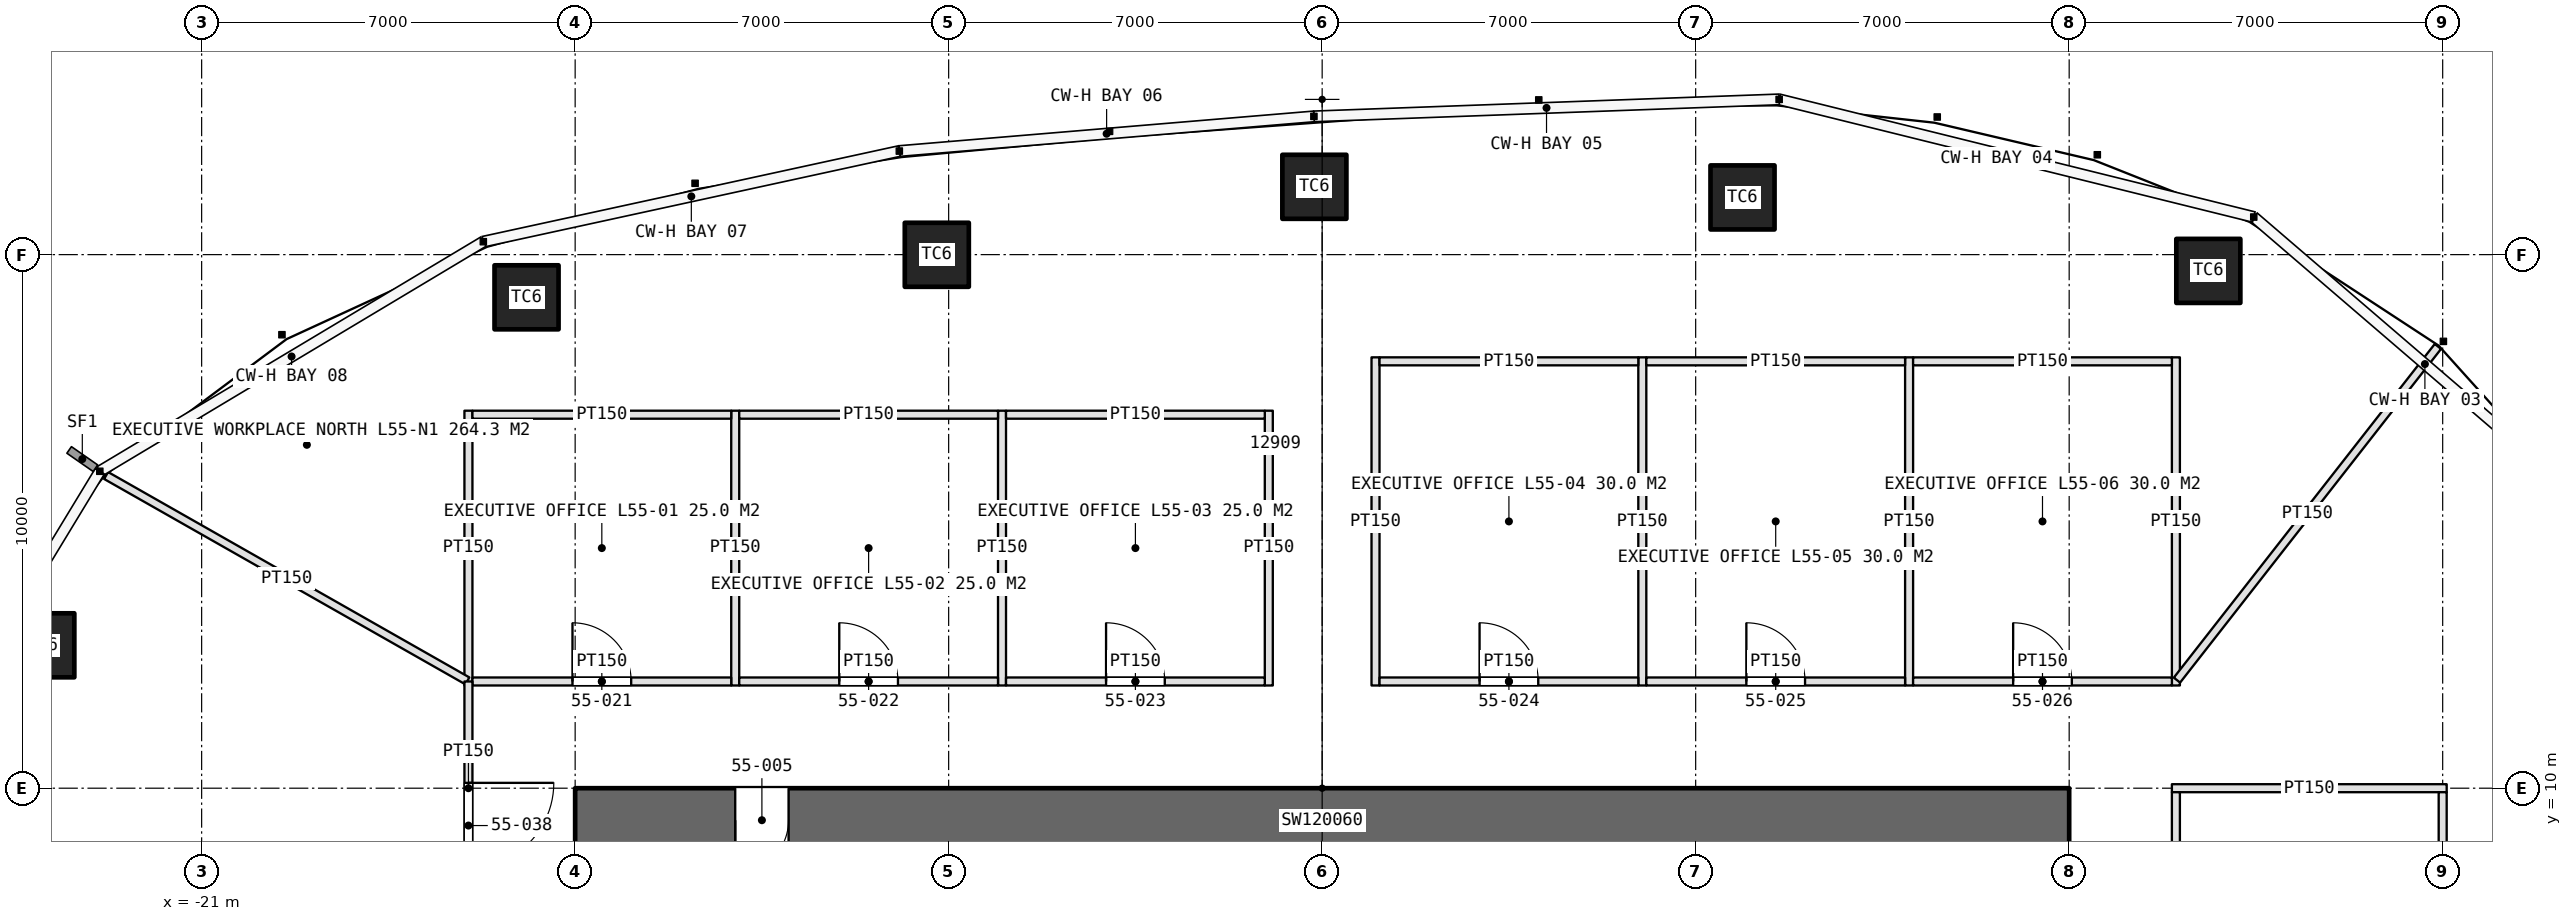
"""IFC4 building model, lengths in metres.
Left out: names, types, materials, properties, quantities, classifications, styles, units other than length and angle.
Written with IfcOpenShell. Run it as: python <this file> out.ifc"""

import sys

from ifc_helpers import new_model, si_unit, direction, frame, frame_2d, origin, origin_2d, place, context, subcontext, project, spatial, rectangle, extrude, element, fill, save


model = new_model("IFC4")
c1 = context("Model", 3, precision=1e-05, world=origin(), true_north=direction((0.0, 1.0)))
c2 = subcontext(c1, "Body", "Model", "MODEL_VIEW")
j1 = project(units=[si_unit("LENGTHUNIT", "METRE"), si_unit("PLANEANGLEUNIT", "RADIAN")], contexts=[c1])
p1 = place(None, origin())
s1 = spatial("IfcSite", under=j1, at=p1, CompositionType="ELEMENT")
p2 = place(p1, origin())
s2 = spatial("IfcBuilding", under=s1, at=p2, CompositionType="ELEMENT")
p3 = place(p2, frame((0.0, 0.0, 249.4)))
s3 = spatial("IfcBuildingStorey", under=s2, at=p3, CompositionType="ELEMENT", Elevation=249.4)
p4 = place(p3, frame((14.0, 9.4, 0.0), z_axis=(0.0, 0.0, 1.0), x_axis=(-1.0, 0.0, 0.0)))
e1 = element("IfcWall", 1, at=p4, inside=s3, PredefinedType="SHEAR", context=c2, shape_type="SweptSolid", body=[
    extrude(rectangle(XDim=28.0, YDim=1.2, at=frame_2d((14.0, 0.0))), origin(), (0.0, 0.0, 1.0), 4.2),
])
p5 = place(p4, frame((24.0, 0.0, 0.0)))
e2 = element("IfcOpeningElement", 2, at=p5, cuts=e1, PredefinedType="OPENING", context=c2, shape_type="SweptSolid", body=[
    extrude(rectangle(XDim=1.0, YDim=2.4, at=frame_2d((0.5, 1.2))), frame((0.0, 0.61, 0.0), z_axis=(0.0, -1.0, 0.0), x_axis=(1.0, 0.0, 0.0)), (0.0, 0.0, 1.0), 1.22),
])
for number, where, z_axis, x_axis in (
    (3, (16.608, 19.695, 0.0), (0.0, 0.0, 1.0), (1.0, 0.0, 0.0)),
    (4, (7.878, 21.072, 0.0), (0.0, 0.0, 1.0), (1.0, 0.0, 0.0)),
    (5, (-0.146, 21.271, 0.0), (0.0, 0.0, 1.0), (1.0, 0.0, 0.0)),
    (6, (-7.222, 19.997, 0.0), (0.0, 0.0, 1.0), (1.0, 0.0, 0.0)),
    (7, (-14.911, 19.2, 0.0), (0.0, 0.0, 1.0), (1.0, 0.0, 0.0)),
    (8, (-23.986, 12.678, 0.0), (0.0, 0.0, 1.0), (1.0, 0.0, 0.0)),
):
    element("IfcColumn", number, at=place(p3, frame(where, z_axis=z_axis, x_axis=x_axis)), inside=s3, PredefinedType="COLUMN", context=c2, shape_type="SweptSolid", body=[
        extrude(rectangle(XDim=1.2, YDim=1.2, at=origin_2d()), origin(), (0.0, 0.0, 1.0), 4.2),
    ])
for number, where, z_axis, x_axis in (
    (9, (-16.0, 11.925, 0.0), (0.0, 0.0, 1.0), (0.0, 1.0, 0.0)),
    (10, (-11.0, 11.925, 0.0), (0.0, 0.0, 1.0), (0.0, 1.0, 0.0)),
    (11, (-6.0, 11.925, 0.0), (0.0, 0.0, 1.0), (0.0, 1.0, 0.0)),
    (12, (-1.0, 11.925, 0.0), (0.0, 0.0, 1.0), (0.0, 1.0, 0.0)),
):
    element("IfcWall", number, at=place(p3, frame(where, z_axis=z_axis, x_axis=x_axis)), inside=s3, PredefinedType="PARTITIONING", context=c2, shape_type="SweptSolid", body=[
        extrude(rectangle(XDim=5.15, YDim=0.15, at=frame_2d((2.575, 0.0))), origin(), (0.0, 0.0, 1.0), 3.0),
    ])
p6 = place(p3, frame((-15.925, 12.0, 0.0), z_axis=(0.0, 0.0, 1.0), x_axis=(1.0, 0.0, 0.0)))
e13 = element("IfcWall", 13, at=p6, inside=s3, PredefinedType="PARTITIONING", context=c2, shape_type="SweptSolid", body=[
    extrude(rectangle(XDim=4.85, YDim=0.15, at=frame_2d((2.425, 0.0))), origin(), (0.0, 0.0, 1.0), 3.0),
])
p7 = place(p6, frame((1.875, 0.0, 0.0)))
e14 = element("IfcOpeningElement", 14, at=p7, cuts=e13, PredefinedType="OPENING", context=c2, shape_type="SweptSolid", body=[
    extrude(rectangle(XDim=1.1, YDim=2.3, at=frame_2d((0.55, 1.15))), frame((0.0, 0.085, 0.0), z_axis=(0.0, -1.0, 0.0), x_axis=(1.0, 0.0, 0.0)), (0.0, 0.0, 1.0), 0.17),
])
p8 = place(p3, frame((-15.925, 17.0, 0.0), z_axis=(0.0, 0.0, 1.0), x_axis=(1.0, 0.0, 0.0)))
e15 = element("IfcWall", 15, at=p8, inside=s3, PredefinedType="PARTITIONING", context=c2, shape_type="SweptSolid", body=[
    extrude(rectangle(XDim=4.85, YDim=0.15, at=frame_2d((2.425, 0.0))), origin(), (0.0, 0.0, 1.0), 3.0),
])
p9 = place(p3, frame((-10.925, 12.0, 0.0), z_axis=(0.0, 0.0, 1.0), x_axis=(1.0, 0.0, 0.0)))
e16 = element("IfcWall", 16, at=p9, inside=s3, PredefinedType="PARTITIONING", context=c2, shape_type="SweptSolid", body=[
    extrude(rectangle(XDim=4.85, YDim=0.15, at=frame_2d((2.425, 0.0))), origin(), (0.0, 0.0, 1.0), 3.0),
])
p10 = place(p9, frame((1.875, 0.0, 0.0)))
e17 = element("IfcOpeningElement", 17, at=p10, cuts=e16, PredefinedType="OPENING", context=c2, shape_type="SweptSolid", body=[
    extrude(rectangle(XDim=1.1, YDim=2.3, at=frame_2d((0.55, 1.15))), frame((0.0, 0.085, 0.0), z_axis=(0.0, -1.0, 0.0), x_axis=(1.0, 0.0, 0.0)), (0.0, 0.0, 1.0), 0.17),
])
p11 = place(p3, frame((-10.925, 17.0, 0.0), z_axis=(0.0, 0.0, 1.0), x_axis=(1.0, 0.0, 0.0)))
e18 = element("IfcWall", 18, at=p11, inside=s3, PredefinedType="PARTITIONING", context=c2, shape_type="SweptSolid", body=[
    extrude(rectangle(XDim=4.85, YDim=0.15, at=frame_2d((2.425, 0.0))), origin(), (0.0, 0.0, 1.0), 3.0),
])
p12 = place(p3, frame((-5.925, 12.0, 0.0), z_axis=(0.0, 0.0, 1.0), x_axis=(1.0, 0.0, 0.0)))
e19 = element("IfcWall", 19, at=p12, inside=s3, PredefinedType="PARTITIONING", context=c2, shape_type="SweptSolid", body=[
    extrude(rectangle(XDim=4.85, YDim=0.15, at=frame_2d((2.425, 0.0))), origin(), (0.0, 0.0, 1.0), 3.0),
])
p13 = place(p12, frame((1.875, 0.0, 0.0)))
e20 = element("IfcOpeningElement", 20, at=p13, cuts=e19, PredefinedType="OPENING", context=c2, shape_type="SweptSolid", body=[
    extrude(rectangle(XDim=1.1, YDim=2.3, at=frame_2d((0.55, 1.15))), frame((0.0, 0.085, 0.0), z_axis=(0.0, -1.0, 0.0), x_axis=(1.0, 0.0, 0.0)), (0.0, 0.0, 1.0), 0.17),
])
p14 = place(p3, frame((-5.925, 17.0, 0.0), z_axis=(0.0, 0.0, 1.0), x_axis=(1.0, 0.0, 0.0)))
e21 = element("IfcWall", 21, at=p14, inside=s3, PredefinedType="PARTITIONING", context=c2, shape_type="SweptSolid", body=[
    extrude(rectangle(XDim=4.85, YDim=0.15, at=frame_2d((2.425, 0.0))), origin(), (0.0, 0.0, 1.0), 3.0),
])
for number, where, z_axis, x_axis in (
    (22, (1.0, 11.925, 0.0), (0.0, 0.0, 1.0), (0.0, 1.0, 0.0)),
    (23, (6.0, 11.925, 0.0), (0.0, 0.0, 1.0), (0.0, 1.0, 0.0)),
    (24, (11.0, 11.925, 0.0), (0.0, 0.0, 1.0), (0.0, 1.0, 0.0)),
    (25, (16.0, 11.925, 0.0), (0.0, 0.0, 1.0), (0.0, 1.0, 0.0)),
):
    element("IfcWall", number, at=place(p3, frame(where, z_axis=z_axis, x_axis=x_axis)), inside=s3, PredefinedType="PARTITIONING", context=c2, shape_type="SweptSolid", body=[
        extrude(rectangle(XDim=6.15, YDim=0.15, at=frame_2d((3.075, 0.0))), origin(), (0.0, 0.0, 1.0), 3.0),
    ])
p15 = place(p3, frame((1.075, 12.0, 0.0), z_axis=(0.0, 0.0, 1.0), x_axis=(1.0, 0.0, 0.0)))
e26 = element("IfcWall", 26, at=p15, inside=s3, PredefinedType="PARTITIONING", context=c2, shape_type="SweptSolid", body=[
    extrude(rectangle(XDim=4.85, YDim=0.15, at=frame_2d((2.425, 0.0))), origin(), (0.0, 0.0, 1.0), 3.0),
])
p16 = place(p15, frame((1.875, 0.0, 0.0)))
e27 = element("IfcOpeningElement", 27, at=p16, cuts=e26, PredefinedType="OPENING", context=c2, shape_type="SweptSolid", body=[
    extrude(rectangle(XDim=1.1, YDim=2.3, at=frame_2d((0.55, 1.15))), frame((0.0, 0.085, 0.0), z_axis=(0.0, -1.0, 0.0), x_axis=(1.0, 0.0, 0.0)), (0.0, 0.0, 1.0), 0.17),
])
p17 = place(p3, frame((1.075, 18.0, 0.0), z_axis=(0.0, 0.0, 1.0), x_axis=(1.0, 0.0, 0.0)))
e28 = element("IfcWall", 28, at=p17, inside=s3, PredefinedType="PARTITIONING", context=c2, shape_type="SweptSolid", body=[
    extrude(rectangle(XDim=4.85, YDim=0.15, at=frame_2d((2.425, 0.0))), origin(), (0.0, 0.0, 1.0), 3.0),
])
p18 = place(p3, frame((6.075, 12.0, 0.0), z_axis=(0.0, 0.0, 1.0), x_axis=(1.0, 0.0, 0.0)))
e29 = element("IfcWall", 29, at=p18, inside=s3, PredefinedType="PARTITIONING", context=c2, shape_type="SweptSolid", body=[
    extrude(rectangle(XDim=4.85, YDim=0.15, at=frame_2d((2.425, 0.0))), origin(), (0.0, 0.0, 1.0), 3.0),
])
p19 = place(p18, frame((1.875, 0.0, 0.0)))
e30 = element("IfcOpeningElement", 30, at=p19, cuts=e29, PredefinedType="OPENING", context=c2, shape_type="SweptSolid", body=[
    extrude(rectangle(XDim=1.1, YDim=2.3, at=frame_2d((0.55, 1.15))), frame((0.0, 0.085, 0.0), z_axis=(0.0, -1.0, 0.0), x_axis=(1.0, 0.0, 0.0)), (0.0, 0.0, 1.0), 0.17),
])
p20 = place(p3, frame((6.075, 18.0, 0.0), z_axis=(0.0, 0.0, 1.0), x_axis=(1.0, 0.0, 0.0)))
e31 = element("IfcWall", 31, at=p20, inside=s3, PredefinedType="PARTITIONING", context=c2, shape_type="SweptSolid", body=[
    extrude(rectangle(XDim=4.85, YDim=0.15, at=frame_2d((2.425, 0.0))), origin(), (0.0, 0.0, 1.0), 3.0),
])
p21 = place(p3, frame((11.075, 12.0, 0.0), z_axis=(0.0, 0.0, 1.0), x_axis=(1.0, 0.0, 0.0)))
e32 = element("IfcWall", 32, at=p21, inside=s3, PredefinedType="PARTITIONING", context=c2, shape_type="SweptSolid", body=[
    extrude(rectangle(XDim=4.85, YDim=0.15, at=frame_2d((2.425, 0.0))), origin(), (0.0, 0.0, 1.0), 3.0),
])
p22 = place(p21, frame((1.875, 0.0, 0.0)))
e33 = element("IfcOpeningElement", 33, at=p22, cuts=e32, PredefinedType="OPENING", context=c2, shape_type="SweptSolid", body=[
    extrude(rectangle(XDim=1.1, YDim=2.3, at=frame_2d((0.55, 1.15))), frame((0.0, 0.085, 0.0), z_axis=(0.0, -1.0, 0.0), x_axis=(1.0, 0.0, 0.0)), (0.0, 0.0, 1.0), 0.17),
])
p23 = place(p3, frame((11.075, 18.0, 0.0), z_axis=(0.0, 0.0, 1.0), x_axis=(1.0, 0.0, 0.0)))
e34 = element("IfcWall", 34, at=p23, inside=s3, PredefinedType="PARTITIONING", context=c2, shape_type="SweptSolid", body=[
    extrude(rectangle(XDim=4.85, YDim=0.15, at=frame_2d((2.425, 0.0))), origin(), (0.0, 0.0, 1.0), 3.0),
])
p24 = place(p3, frame((15.925, 10.0, 0.0), z_axis=(0.0, 0.0, 1.0), x_axis=(1.0, 0.0, 0.0)))
e35 = element("IfcWall", 35, at=p24, inside=s3, PredefinedType="PARTITIONING", context=c2, shape_type="SweptSolid", body=[
    extrude(rectangle(XDim=5.15, YDim=0.15, at=frame_2d((2.575, 0.0))), origin(), (0.0, 0.0, 1.0), 3.0),
])
p25 = place(p3, frame((16.0, 5.075, 0.0), z_axis=(0.0, 0.0, 1.0), x_axis=(0.0, 1.0, 0.0)))
e36 = element("IfcWall", 36, at=p25, inside=s3, PredefinedType="PARTITIONING", context=c2, shape_type="SweptSolid", body=[
    extrude(rectangle(XDim=4.85, YDim=0.15, at=frame_2d((2.425, 0.0))), origin(), (0.0, 0.0, 1.0), 3.0),
])
p26 = place(p25, frame((1.875, 0.0, 0.0)))
e37 = element("IfcOpeningElement", 37, at=p26, cuts=e36, PredefinedType="OPENING", context=c2, shape_type="SweptSolid", body=[
    extrude(rectangle(XDim=1.1, YDim=2.3, at=frame_2d((0.55, 1.15))), frame((0.0, 0.085, 0.0), z_axis=(0.0, -1.0, 0.0), x_axis=(1.0, 0.0, 0.0)), (0.0, 0.0, 1.0), 0.17),
])
p27 = place(p3, frame((21.0, 5.075, 0.0), z_axis=(0.0, 0.0, 1.0), x_axis=(0.0, 1.0, 0.0)))
e38 = element("IfcWall", 38, at=p27, inside=s3, PredefinedType="PARTITIONING", context=c2, shape_type="SweptSolid", body=[
    extrude(rectangle(XDim=4.85, YDim=0.15, at=frame_2d((2.425, 0.0))), origin(), (0.0, 0.0, 1.0), 3.0),
])
p28 = place(p3, frame((-16.02, 12.011, 0.0), z_axis=(0.0, 0.0, 1.0), x_axis=(-0.869354026591, 0.494189818238, 0.0)))
e39 = element("IfcWall", 39, at=p28, inside=s3, PredefinedType="PARTITIONING", context=c2, shape_type="SweptSolid", body=[
    extrude(rectangle(XDim=7.788, YDim=0.15, at=frame_2d((3.894, 0.0))), origin(), (0.0, 0.0, 1.0), 3.0),
])
p29 = place(p3, frame((16.02, 12.026, 0.0), z_axis=(0.0, 0.0, 1.0), x_axis=(0.616031272047, 0.787721696959, 0.0)))
e40 = element("IfcWall", 40, at=p29, inside=s3, PredefinedType="PARTITIONING", context=c2, shape_type="SweptSolid", body=[
    extrude(rectangle(XDim=7.939, YDim=0.15, at=frame_2d((3.969, 0.0))), origin(), (0.0, 0.0, 1.0), 3.0),
])
p30 = place(p3, frame((-16.0, 12.0, 0.0), z_axis=(0.0, 0.0, 1.0), x_axis=(0.0, -1.0, 0.0)))
e41 = element("IfcWall", 41, at=p30, inside=s3, PredefinedType="PARTITIONING", context=c2, shape_type="SweptSolid", body=[
    extrude(rectangle(XDim=4.0, YDim=0.15, at=frame_2d((2.0, 0.0))), origin(), (0.0, 0.0, 1.0), 3.0),
])
p31 = place(p30, frame((1.9, 0.0, 0.0)))
e42 = element("IfcOpeningElement", 42, at=p31, cuts=e41, PredefinedType="OPENING", context=c2, shape_type="SweptSolid", body=[
    extrude(rectangle(XDim=1.6, YDim=2.4, at=frame_2d((0.8, 1.2))), frame((0.0, 0.085, 0.0), z_axis=(0.0, -1.0, 0.0), x_axis=(1.0, 0.0, 0.0)), (0.0, 0.0, 1.0), 0.17),
])
p32 = place(p5, origin())
e43 = element("IfcDoor", 43, at=p32, inside=s3, OperationType="SINGLE_SWING_RIGHT", PredefinedType="DOOR", context=c2, shape_type="SweptSolid", body=[
    extrude(rectangle(XDim=1.0, YDim=2.4, at=frame_2d((0.5, 1.2))), frame((0.0, 0.025, 0.0), z_axis=(0.0, -1.0, 0.0), x_axis=(1.0, 0.0, 0.0)), (0.0, 0.0, 1.0), 0.05),
])
fill(e2, e43)
p33 = place(p7, origin())
e44 = element("IfcDoor", 44, at=p33, inside=s3, OperationType="SINGLE_SWING_LEFT", PredefinedType="DOOR", context=c2, shape_type="SweptSolid", body=[
    extrude(rectangle(XDim=1.1, YDim=2.3, at=frame_2d((0.55, 1.15))), frame((0.0, 0.025, 0.0), z_axis=(0.0, -1.0, 0.0), x_axis=(1.0, 0.0, 0.0)), (0.0, 0.0, 1.0), 0.05),
])
fill(e14, e44)
p34 = place(p10, origin())
e45 = element("IfcDoor", 45, at=p34, inside=s3, OperationType="SINGLE_SWING_LEFT", PredefinedType="DOOR", context=c2, shape_type="SweptSolid", body=[
    extrude(rectangle(XDim=1.1, YDim=2.3, at=frame_2d((0.55, 1.15))), frame((0.0, 0.025, 0.0), z_axis=(0.0, -1.0, 0.0), x_axis=(1.0, 0.0, 0.0)), (0.0, 0.0, 1.0), 0.05),
])
fill(e17, e45)
p35 = place(p13, origin())
e46 = element("IfcDoor", 46, at=p35, inside=s3, OperationType="SINGLE_SWING_LEFT", PredefinedType="DOOR", context=c2, shape_type="SweptSolid", body=[
    extrude(rectangle(XDim=1.1, YDim=2.3, at=frame_2d((0.55, 1.15))), frame((0.0, 0.025, 0.0), z_axis=(0.0, -1.0, 0.0), x_axis=(1.0, 0.0, 0.0)), (0.0, 0.0, 1.0), 0.05),
])
fill(e20, e46)
p36 = place(p16, origin())
e47 = element("IfcDoor", 47, at=p36, inside=s3, OperationType="SINGLE_SWING_LEFT", PredefinedType="DOOR", context=c2, shape_type="SweptSolid", body=[
    extrude(rectangle(XDim=1.1, YDim=2.3, at=frame_2d((0.55, 1.15))), frame((0.0, 0.025, 0.0), z_axis=(0.0, -1.0, 0.0), x_axis=(1.0, 0.0, 0.0)), (0.0, 0.0, 1.0), 0.05),
])
fill(e27, e47)
p37 = place(p19, origin())
e48 = element("IfcDoor", 48, at=p37, inside=s3, OperationType="SINGLE_SWING_LEFT", PredefinedType="DOOR", context=c2, shape_type="SweptSolid", body=[
    extrude(rectangle(XDim=1.1, YDim=2.3, at=frame_2d((0.55, 1.15))), frame((0.0, 0.025, 0.0), z_axis=(0.0, -1.0, 0.0), x_axis=(1.0, 0.0, 0.0)), (0.0, 0.0, 1.0), 0.05),
])
fill(e30, e48)
p38 = place(p22, origin())
e49 = element("IfcDoor", 49, at=p38, inside=s3, OperationType="SINGLE_SWING_LEFT", PredefinedType="DOOR", context=c2, shape_type="SweptSolid", body=[
    extrude(rectangle(XDim=1.1, YDim=2.3, at=frame_2d((0.55, 1.15))), frame((0.0, 0.025, 0.0), z_axis=(0.0, -1.0, 0.0), x_axis=(1.0, 0.0, 0.0)), (0.0, 0.0, 1.0), 0.05),
])
fill(e33, e49)
p39 = place(p31, origin())
e50 = element("IfcDoor", 50, at=p39, inside=s3, OperationType="DOUBLE_DOOR_SINGLE_SWING", PredefinedType="DOOR", context=c2, shape_type="SweptSolid", body=[
    extrude(rectangle(XDim=1.6, YDim=2.4, at=frame_2d((0.8, 1.2))), frame((0.0, 0.025, 0.0), z_axis=(0.0, -1.0, 0.0), x_axis=(1.0, 0.0, 0.0)), (0.0, 0.0, 1.0), 0.05),
])
fill(e42, e50)
save(model, sys.argv[1])
